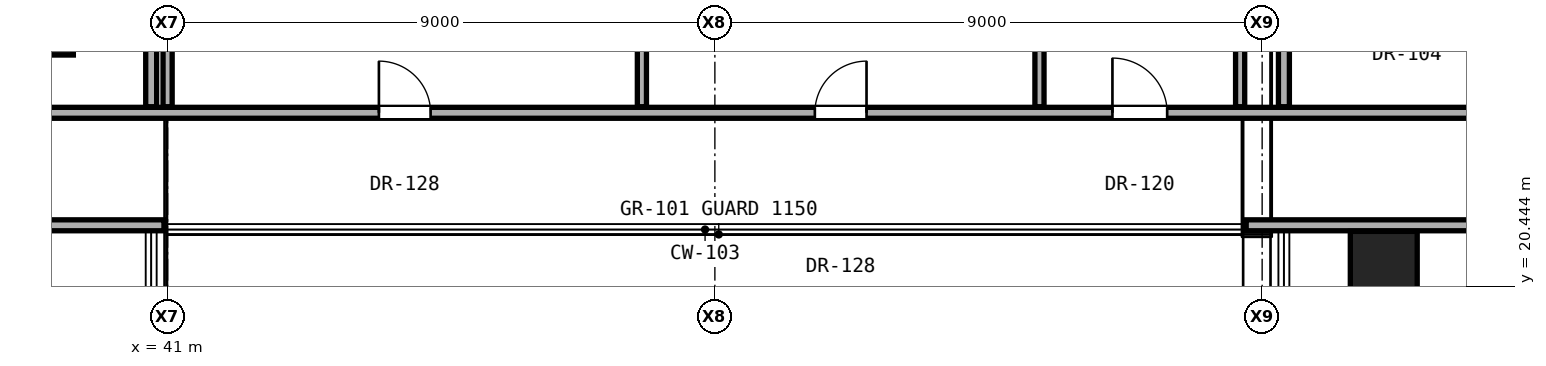
"""IFC4 building model, lengths in metres.
Left out: names, types, materials, properties, quantities, classifications, styles, units other than length and angle.
Written with IfcOpenShell. Run it as: python <this file> out.ifc"""

import sys

from ifc_helpers import new_model, si_unit, direction, frame, frame_2d, origin, origin_2d, place, context, subcontext, project, spatial, rectangle, hollow_rectangle, extrude, element, fill, save


model = new_model("IFC4")
c1 = context("Model", 3, precision=1e-05, world=origin(), true_north=direction((0.0, 1.0)))
c2 = subcontext(c1, "Body", "Model", "MODEL_VIEW")
j1 = project(units=[si_unit("LENGTHUNIT", "METRE"), si_unit("PLANEANGLEUNIT", "RADIAN")], contexts=[c1])
p1 = place(None, origin())
s1 = spatial("IfcSite", under=j1, at=p1, CompositionType="ELEMENT")
p2 = place(p1, origin())
s2 = spatial("IfcBuilding", under=s1, at=p2, CompositionType="ELEMENT")
p3 = place(p2, frame((0.0, 0.0, 88.4)))
s3 = spatial("IfcBuildingStorey", under=s2, at=p3, CompositionType="ELEMENT", Elevation=88.4)
for number, where, z_axis, x_axis in (
    (1, (38.9, 24.8, 0.0), (0.0, 0.0, 1.0), (1.0, 0.0, 0.0)),
    (2, (61.0, 20.8, 0.0), (0.0, 0.0, 1.0), (1.0, 0.0, 0.0)),
):
    element("IfcColumn", number, at=place(p3, frame(where, z_axis=z_axis, x_axis=x_axis)), inside=s3, PredefinedType="COLUMN", context=c2, shape_type="SweptSolid", body=[
        extrude(hollow_rectangle(XDim=1.1, YDim=1.1, WallThickness=0.06, at=origin_2d()), origin(), (0.0, 0.0, 1.0), 3.3),
    ])
p4 = place(p3, frame((32.14, 21.45, 0.0), z_axis=(0.0, 0.0, 1.0), x_axis=(1.0, 0.0, 0.0)))
e3 = element("IfcWall", 3, at=p4, inside=s3, PredefinedType="PARTITIONING", context=c2, shape_type="SweptSolid", body=[
    extrude(rectangle(XDim=8.8, YDim=0.18, at=frame_2d((4.4, 0.0))), origin(), (0.0, 0.0, 1.0), 2.085),
])
p5 = place(p3, frame((58.738, 21.45, 0.0), z_axis=(0.0, 0.0, 1.0), x_axis=(1.0, 0.0, 0.0)))
e4 = element("IfcWall", 4, at=p5, inside=s3, PredefinedType="PARTITIONING", context=c2, shape_type="SweptSolid", body=[
    extrude(rectangle(XDim=6.512, YDim=0.18, at=frame_2d((3.256, 0.0))), origin(), (0.0, 0.0, 1.0), 2.085),
])
p6 = place(p5, frame((4.117, 0.0, 0.0)))
e5 = element("IfcOpeningElement", 5, at=p6, cuts=e4, PredefinedType="OPENING", context=c2, shape_type="SweptSolid", body=[
    extrude(rectangle(XDim=0.85, YDim=2.01, at=frame_2d((0.425, 1.005))), frame((0.0, 0.1, 0.0), z_axis=(0.0, -1.0, 0.0), x_axis=(1.0, 0.0, 0.0)), (0.0, 0.0, 1.0), 0.2),
])
p7 = place(p3, frame((32.14, 23.3, 0.0), z_axis=(0.0, 0.0, 1.0), x_axis=(1.0, 0.0, 0.0)))
e6 = element("IfcWall", 6, at=p7, inside=s3, PredefinedType="PARTITIONING", context=c2, shape_type="SweptSolid", body=[
    extrude(rectangle(XDim=33.11, YDim=0.18, at=frame_2d((16.555, 0.0))), origin(), (0.0, 0.0, 1.0), 2.145),
])
p8 = place(p7, frame((12.335, 0.0, 0.0)))
e7 = element("IfcOpeningElement", 7, at=p8, cuts=e6, PredefinedType="OPENING", context=c2, shape_type="SweptSolid", body=[
    extrude(rectangle(XDim=0.85, YDim=2.01, at=frame_2d((0.425, 1.005))), frame((0.0, 0.1, 0.0), z_axis=(0.0, -1.0, 0.0), x_axis=(1.0, 0.0, 0.0)), (0.0, 0.0, 1.0), 0.2),
])
p9 = place(p7, frame((19.504, 0.0, 0.0)))
e8 = element("IfcOpeningElement", 8, at=p9, cuts=e6, PredefinedType="OPENING", context=c2, shape_type="SweptSolid", body=[
    extrude(rectangle(XDim=0.85, YDim=2.01, at=frame_2d((0.425, 1.005))), frame((0.0, 0.1, 0.0), z_axis=(0.0, -1.0, 0.0), x_axis=(1.0, 0.0, 0.0)), (0.0, 0.0, 1.0), 0.2),
])
p10 = place(p7, frame((24.398, 0.0, 0.0)))
e9 = element("IfcOpeningElement", 9, at=p10, cuts=e6, PredefinedType="OPENING", context=c2, shape_type="SweptSolid", body=[
    extrude(rectangle(XDim=0.9, YDim=2.1, at=frame_2d((0.45, 1.05))), frame((0.0, 0.1, 0.0), z_axis=(0.0, -1.0, 0.0), x_axis=(1.0, 0.0, 0.0)), (0.0, 0.0, 1.0), 0.2),
])
p11 = place(p3, frame((40.73, 23.4, 0.0), z_axis=(0.0, 0.0, 1.0), x_axis=(0.0, 1.0, 0.0)))
e10 = element("IfcWall", 10, at=p11, inside=s3, PredefinedType="PARTITIONING", context=c2, shape_type="SweptSolid", body=[
    extrude(rectangle(XDim=5.4, YDim=0.18, at=frame_2d((2.7, 0.0))), origin(), (0.0, 0.0, 1.0), 2.085),
])
for number, where, z_axis, x_axis in (
    (11, (41.0, 23.4, 0.0), (0.0, 0.0, 1.0), (0.0, 1.0, 0.0)),
    (12, (48.8, 23.4, 0.0), (0.0, 0.0, 1.0), (0.0, 1.0, 0.0)),
):
    element("IfcWall", number, at=place(p3, frame(where, z_axis=z_axis, x_axis=x_axis)), inside=s3, PredefinedType="PARTITIONING", context=c2, shape_type="SweptSolid", body=[
        extrude(rectangle(XDim=9.065, YDim=0.15, at=frame_2d((4.533, 0.0))), origin(), (0.0, 0.0, 1.0), 2.085),
    ])
for number, where, z_axis, x_axis in (
    (13, (55.338, 23.4, 0.0), (0.0, 0.0, 1.0), (0.0, 1.0, 0.0)),
    (14, (58.638, 23.4, 0.0), (0.0, 0.0, 1.0), (0.0, 1.0, 0.0)),
):
    element("IfcWall", number, at=place(p3, frame(where, z_axis=z_axis, x_axis=x_axis)), inside=s3, PredefinedType="PARTITIONING", context=c2, shape_type="SweptSolid", body=[
        extrude(rectangle(XDim=3.115, YDim=0.15, at=frame_2d((1.558, 0.0))), origin(), (0.0, 0.0, 1.0), 3.02),
    ])
p12 = place(p3, frame((59.358, 23.4, 0.0), z_axis=(0.0, 0.0, 1.0), x_axis=(0.0, 1.0, 0.0)))
e15 = element("IfcWall", 15, at=p12, inside=s3, PredefinedType="PARTITIONING", context=c2, shape_type="SweptSolid", body=[
    extrude(rectangle(XDim=1.924, YDim=0.18, at=frame_2d((0.962, 0.0))), origin(), (0.0, 0.0, 1.0), 3.08),
])
p13 = place(p8, origin())
e16 = element("IfcDoor", 16, at=p13, inside=s3, OperationType="SINGLE_SWING_LEFT", PredefinedType="DOOR", context=c2, shape_type="SweptSolid", body=[
    extrude(rectangle(XDim=0.85, YDim=2.01, at=frame_2d((0.425, 1.005))), frame((0.0, 0.025, 0.0), z_axis=(0.0, -1.0, 0.0), x_axis=(1.0, 0.0, 0.0)), (0.0, 0.0, 1.0), 0.05),
])
fill(e7, e16)
p14 = place(p9, origin())
e17 = element("IfcDoor", 17, at=p14, inside=s3, OperationType="SINGLE_SWING_RIGHT", PredefinedType="DOOR", context=c2, shape_type="SweptSolid", body=[
    extrude(rectangle(XDim=0.85, YDim=2.01, at=frame_2d((0.425, 1.005))), frame((0.0, 0.025, 0.0), z_axis=(0.0, -1.0, 0.0), x_axis=(1.0, 0.0, 0.0)), (0.0, 0.0, 1.0), 0.05),
])
fill(e8, e17)
p15 = place(p10, origin())
e18 = element("IfcDoor", 18, at=p15, inside=s3, OperationType="SINGLE_SWING_LEFT", PredefinedType="DOOR", context=c2, shape_type="SweptSolid", body=[
    extrude(rectangle(XDim=0.9, YDim=2.1, at=frame_2d((0.45, 1.05))), frame((0.0, 0.025, 0.0), z_axis=(0.0, -1.0, 0.0), x_axis=(1.0, 0.0, 0.0)), (0.0, 0.0, 1.0), 0.05),
])
fill(e9, e18)
save(model, sys.argv[1])
